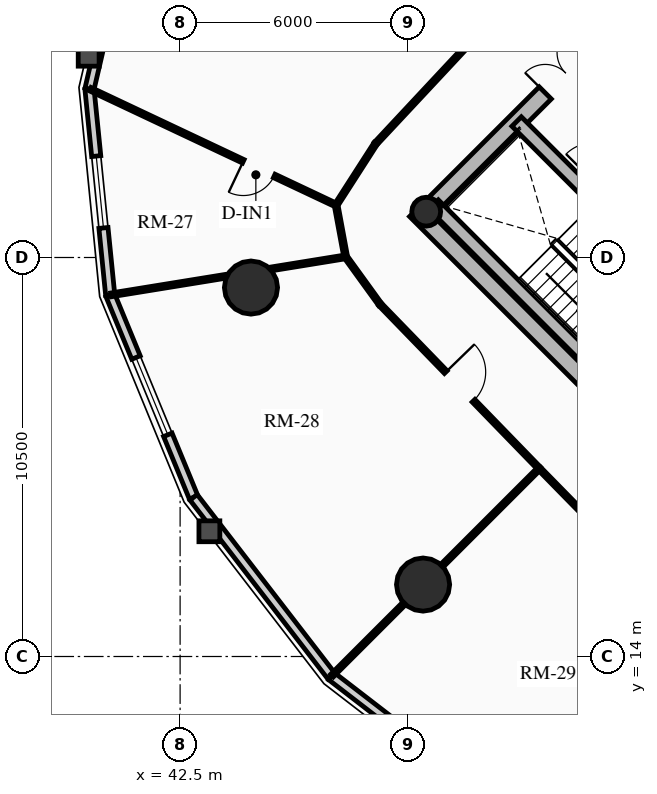
"""IFC4 building model, lengths in metres.
Left out: names, types, materials, properties, quantities, classifications, styles, units other than length and angle.
Written with IfcOpenShell. Run it as: python <this file> out.ifc"""

import sys

from ifc_helpers import new_model, si_unit, direction, frame, frame_2d, origin, origin_2d, place, context, subcontext, project, spatial, rectangle, circle, hollow_circle, extrude, source, transform, mapped, element, fill, save


model = new_model("IFC4")
c1 = context("Model", 3, precision=1e-05, world=origin(), true_north=direction((0.0, 1.0)))
c2 = subcontext(c1, "Body", "Model", "MODEL_VIEW")
j1 = project(units=[si_unit("LENGTHUNIT", "METRE"), si_unit("PLANEANGLEUNIT", "RADIAN")], contexts=[c1])
p1 = place(None, origin())
s1 = spatial("IfcSite", under=j1, at=p1, CompositionType="ELEMENT")
p2 = place(p1, origin())
s2 = spatial("IfcBuilding", under=s1, at=p2, CompositionType="ELEMENT")
p3 = place(p2, frame((0.0, 0.0, 99.25)))
s3 = spatial("IfcBuildingStorey", under=s2, at=p3, CompositionType="ELEMENT", Elevation=99.25)
p4 = place(p3, frame((58.737, 15.697, 0.0), z_axis=(0.0, 0.0, 1.0), x_axis=(-0.707106781187, 0.707106781187, 0.0)))
e1 = element("IfcWall", 1, at=p4, inside=s3, PredefinedType="SHEAR", context=c2, shape_type="SweptSolid", body=[
    extrude(rectangle(XDim=14.2, YDim=0.45, at=frame_2d((7.1, 0.0))), origin(), (0.0, 0.0, 1.0), 2.91),
])
p5 = place(p3, frame((48.856, 25.578, 0.0), z_axis=(0.0, 0.0, 1.0), x_axis=(0.707106781187, 0.707106781187, 0.0)))
e2 = element("IfcWall", 2, at=p5, inside=s3, PredefinedType="SHEAR", context=c2, shape_type="SweptSolid", body=[
    extrude(rectangle(XDim=10.7, YDim=0.45, at=frame_2d((5.35, 0.0))), origin(), (0.0, 0.0, 1.0), 2.91),
])
m1 = source(origin(), c2, "Body", "SweptSolid", [
    extrude(rectangle(XDim=1.5, YDim=2.02, at=frame_2d((0.75, 1.01))), frame((0.0, 0.235, 0.0), z_axis=(0.0, -1.0, 0.0), x_axis=(1.0, 0.0, 0.0)), (0.0, 0.0, 1.0), 0.47),
])
p6 = place(p5, frame((4.6, 0.0, 0.0)))
e3 = element("IfcOpeningElement", 3, at=p6, cuts=e2, PredefinedType="OPENING", context=c2, shape_type="MappedRepresentation", body=[
    mapped(m1, transform((0.0, 0.0, 0.0), x_axis=(1.0, 0.0, 0.0), y_axis=(0.0, 1.0, 0.0), z_axis=(0.0, 0.0, 1.0), scale=1.0)),
])
p7 = place(p3, frame((61.078, 18.355, 0.0), z_axis=(0.0, 0.0, 1.0), x_axis=(-0.707106781187, 0.707106781187, 0.0)))
e4 = element("IfcWall", 4, at=p7, inside=s3, PredefinedType="SHEAR", context=c2, shape_type="SweptSolid", body=[
    extrude(rectangle(XDim=13.75, YDim=0.35, at=frame_2d((6.875, 0.0))), origin(), (0.0, 0.0, 1.0), 2.91),
])
m2 = source(origin(), c2, "Body", "SweptSolid", [
    extrude(rectangle(XDim=1.1, YDim=2.015, at=frame_2d((0.55, 1.007))), frame((0.0, 0.185, 0.0), z_axis=(0.0, -1.0, 0.0), x_axis=(1.0, 0.0, 0.0)), (0.0, 0.0, 1.0), 0.37),
])
p8 = place(p7, frame((4.875, 0.0, 0.0)))
e5 = element("IfcOpeningElement", 5, at=p8, cuts=e4, PredefinedType="OPENING", context=c2, shape_type="MappedRepresentation", body=[
    mapped(m2, transform((0.0, 0.0, 0.0), x_axis=(1.0, 0.0, 0.0), y_axis=(0.0, 1.0, 0.0), z_axis=(0.0, 0.0, 1.0), scale=1.0)),
])
m3 = source(origin(), c2, "Body", "SweptSolid", [
    extrude(rectangle(XDim=1.15, YDim=2.02, at=frame_2d((0.575, 1.01))), frame((0.0, 0.185, 0.0), z_axis=(0.0, -1.0, 0.0), x_axis=(1.0, 0.0, 0.0)), (0.0, 0.0, 1.0), 0.37),
])
p9 = place(p7, frame((7.295, 0.0, 0.0)))
e6 = element("IfcOpeningElement", 6, at=p9, cuts=e4, PredefinedType="OPENING", context=c2, shape_type="MappedRepresentation", body=[
    mapped(m3, transform((0.0, 0.0, 0.0), x_axis=(1.0, 0.0, 0.0), y_axis=(0.0, 1.0, 0.0), z_axis=(0.0, 0.0, 1.0), scale=1.0)),
])
p10 = place(p3, frame((53.922, 21.141, 0.0), z_axis=(0.0, 0.0, 1.0), x_axis=(-0.707088616009, 0.707124945897, 0.0)))
e7 = element("IfcWall", 7, at=p10, inside=s3, PredefinedType="SHEAR", context=c2, shape_type="SweptSolid", body=[
    extrude(rectangle(XDim=6.72, YDim=0.35, at=frame_2d((3.36, 0.0))), origin(), (0.0, 0.0, 1.0), 2.91),
])
p11 = place(p3, frame((48.976, 25.706, 0.0), z_axis=(0.0, 0.0, 1.0), x_axis=(0.707106781187, 0.707106781187, 0.0)))
e8 = element("IfcColumn", 8, at=p11, inside=s3, PredefinedType="COLUMN", context=c2, shape_type="SweptSolid", body=[
    extrude(hollow_circle(Radius=0.38, WallThickness=0.032, at=origin_2d()), origin(), (0.0, 0.0, 1.0), 2.91),
])
for number, where, z_axis, x_axis in (
    (9, (44.365, 23.709, 0.0), (0.0, 0.0, 1.0), (1.0, 0.0, 0.0)),
    (10, (48.893, 15.893, 0.0), (0.0, 0.0, 1.0), (1.0, 0.0, 0.0)),
):
    element("IfcColumn", number, at=place(p3, frame(where, z_axis=z_axis, x_axis=x_axis)), inside=s3, PredefinedType="USERDEFINED", context=c2, shape_type="SweptSolid", body=[
        extrude(circle(Radius=0.7, at=origin_2d()), origin(), (0.0, 0.0, 1.0), 2.91),
    ])
p12 = place(p3, frame((40.115, 28.933, 0.0), z_axis=(0.0, 0.0, 1.0), x_axis=(0.225834725257, 0.974165631126, 0.0)))
e11 = element("IfcWall", 11, at=p12, inside=s3, PredefinedType="SOLIDWALL", context=c2, shape_type="SweptSolid", body=[
    extrude(rectangle(XDim=5.119, YDim=0.24, at=frame_2d((2.56, 0.0))), origin(), (0.0, 0.0, 1.0), 2.179),
])
p13 = place(p3, frame((40.661, 23.513, 0.0), z_axis=(0.0, 0.0, 1.0), x_axis=(-0.10015591906, 0.994971754311, 0.0)))
e12 = element("IfcWall", 12, at=p13, inside=s3, PredefinedType="SOLIDWALL", context=c2, shape_type="SweptSolid", body=[
    extrude(rectangle(XDim=5.448, YDim=0.24, at=frame_2d((2.724, 0.0))), origin(), (0.0, 0.0, 1.0), 2.179),
])
m4 = source(origin(), c2, "Body", "SweptSolid", [
    extrude(rectangle(XDim=1.9, YDim=1.35, at=frame_2d((0.95, 0.675))), frame((0.0, 0.13, 0.0), z_axis=(0.0, -1.0, 0.0), x_axis=(1.0, 0.0, 0.0)), (0.0, 0.0, 1.0), 0.26),
])
p14 = place(p13, frame((1.774, 0.0, 0.65)))
e13 = element("IfcOpeningElement", 13, at=p14, cuts=e12, PredefinedType="OPENING", context=c2, shape_type="MappedRepresentation", body=[
    mapped(m4, transform((0.0, 0.0, 0.0), x_axis=(1.0, 0.0, 0.0), y_axis=(0.0, 1.0, 0.0), z_axis=(0.0, 0.0, 1.0), scale=1.0)),
])
p15 = place(p3, frame((42.855, 18.189, 0.0), z_axis=(0.0, 0.0, 1.0), x_axis=(-0.381027003055, 0.924563909604, 0.0)))
e14 = element("IfcWall", 14, at=p15, inside=s3, PredefinedType="SOLIDWALL", context=c2, shape_type="SweptSolid", body=[
    extrude(rectangle(XDim=5.758, YDim=0.24, at=frame_2d((2.879, 0.0))), origin(), (0.0, 0.0, 1.0), 2.179),
])
m5 = source(origin(), c2, "Body", "SweptSolid", [
    extrude(rectangle(XDim=2.2, YDim=1.35, at=frame_2d((1.1, 0.675))), frame((0.0, 0.13, 0.0), z_axis=(0.0, -1.0, 0.0), x_axis=(1.0, 0.0, 0.0)), (0.0, 0.0, 1.0), 0.26),
])
p16 = place(p15, frame((1.779, 0.0, 0.65)))
e15 = element("IfcOpeningElement", 15, at=p16, cuts=e14, PredefinedType="OPENING", context=c2, shape_type="MappedRepresentation", body=[
    mapped(m5, transform((0.0, 0.0, 0.0), x_axis=(1.0, 0.0, 0.0), y_axis=(0.0, 1.0, 0.0), z_axis=(0.0, 0.0, 1.0), scale=1.0)),
])
p17 = place(p3, frame((46.483, 13.483, 0.0), z_axis=(0.0, 0.0, 1.0), x_axis=(-0.61054437102, 0.791982052206, 0.0)))
e16 = element("IfcWall", 16, at=p17, inside=s3, PredefinedType="SOLIDWALL", context=c2, shape_type="SweptSolid", body=[
    extrude(rectangle(XDim=5.942, YDim=0.24, at=frame_2d((2.971, 0.0))), origin(), (0.0, 0.0, 1.0), 2.179),
])
p18 = place(p3, frame((51.189, 9.855, 0.0), z_axis=(0.0, 0.0, 1.0), x_axis=(-0.791982052206, 0.61054437102, 0.0)))
e17 = element("IfcWall", 17, at=p18, inside=s3, PredefinedType="SOLIDWALL", context=c2, shape_type="SweptSolid", body=[
    extrude(rectangle(XDim=5.942, YDim=0.24, at=frame_2d((2.971, 0.0))), origin(), (0.0, 0.0, 1.0), 2.179),
])
p19 = place(p18, frame((2.021, 0.0, 0.65)))
e18 = element("IfcOpeningElement", 18, at=p19, cuts=e17, PredefinedType="OPENING", context=c2, shape_type="MappedRepresentation", body=[
    mapped(m4, transform((0.0, 0.0, 0.0), x_axis=(1.0, 0.0, 0.0), y_axis=(0.0, 1.0, 0.0), z_axis=(0.0, 0.0, 1.0), scale=1.0)),
])
p20 = place(p3, frame((52.072, 32.237, 0.0), z_axis=(0.0, 0.0, 1.0), x_axis=(-0.682528774423, -0.730858722383, 0.0)))
e19 = element("IfcWall", 19, at=p20, inside=s3, PredefinedType="MOVABLE", context=c2, shape_type="SweptSolid", body=[
    extrude(rectangle(XDim=6.486, YDim=0.1, at=frame_2d((3.243, 0.0))), origin(), (0.0, 0.0, 1.0), 2.225),
])
p21 = place(p3, frame((47.645, 27.497, 0.0), z_axis=(0.0, 0.0, 1.0), x_axis=(-0.540680612097, -0.841227957038, 0.0)))
e20 = element("IfcWall", 20, at=p21, inside=s3, PredefinedType="MOVABLE", context=c2, shape_type="SweptSolid", body=[
    extrude(rectangle(XDim=1.924, YDim=0.1, at=frame_2d((0.962, 0.0))), origin(), (0.0, 0.0, 1.0), 2.225),
])
p22 = place(p3, frame((46.605, 25.879, 0.0), z_axis=(0.0, 0.0, 1.0), x_axis=(0.182019785456, -0.983294868136, 0.0)))
e21 = element("IfcWall", 21, at=p22, inside=s3, PredefinedType="MOVABLE", context=c2, shape_type="SweptSolid", body=[
    extrude(rectangle(XDim=1.384, YDim=0.1, at=frame_2d((0.692, 0.0))), origin(), (0.0, 0.0, 1.0), 2.225),
])
p23 = place(p3, frame((46.857, 24.518, 0.0), z_axis=(0.0, 0.0, 1.0), x_axis=(0.58624548148, -0.810133467674, 0.0)))
e22 = element("IfcWall", 22, at=p23, inside=s3, PredefinedType="MOVABLE", context=c2, shape_type="SweptSolid", body=[
    extrude(rectangle(XDim=1.546, YDim=0.1, at=frame_2d((0.773, 0.0))), origin(), (0.0, 0.0, 1.0), 2.225),
])
p24 = place(p3, frame((47.763, 23.265, 0.0), z_axis=(0.0, 0.0, 1.0), x_axis=(0.696243493404, -0.717805682544, 0.0)))
e23 = element("IfcWall", 23, at=p24, inside=s3, PredefinedType="MOVABLE", context=c2, shape_type="SweptSolid", body=[
    extrude(rectangle(XDim=6.012, YDim=0.1, at=frame_2d((3.006, 0.0))), origin(), (0.0, 0.0, 1.0), 2.655),
])
m6 = source(origin(), c2, "Body", "SweptSolid", [
    extrude(rectangle(XDim=1.05, YDim=2.015, at=frame_2d((0.525, 1.007))), frame((0.0, 0.06, 0.0), z_axis=(0.0, -1.0, 0.0), x_axis=(1.0, 0.0, 0.0)), (0.0, 0.0, 1.0), 0.12),
])
p25 = place(p24, frame((2.481, 0.0, 0.0)))
e24 = element("IfcOpeningElement", 24, at=p25, cuts=e23, PredefinedType="OPENING", context=c2, shape_type="MappedRepresentation", body=[
    mapped(m6, transform((0.0, 0.0, 0.0), x_axis=(1.0, 0.0, 0.0), y_axis=(0.0, 1.0, 0.0), z_axis=(0.0, 0.0, 1.0), scale=1.0)),
])
p26 = place(p3, frame((51.949, 18.949, 0.0), z_axis=(0.0, 0.0, 1.0), x_axis=(0.699840807936, -0.714298847506, 0.0)))
e25 = element("IfcWall", 25, at=p26, inside=s3, PredefinedType="MOVABLE", context=c2, shape_type="SweptSolid", body=[
    extrude(rectangle(XDim=6.13, YDim=0.1, at=frame_2d((3.065, 0.0))), origin(), (0.0, 0.0, 1.0), 2.225),
])
p27 = place(p3, frame((46.857, 24.518, 0.0), z_axis=(0.0, 0.0, 1.0), x_axis=(-0.987101644997, -0.160094792056, 0.0)))
e26 = element("IfcWall", 26, at=p27, inside=s3, PredefinedType="MOVABLE", context=c2, shape_type="SweptSolid", body=[
    extrude(rectangle(XDim=6.257, YDim=0.1, at=frame_2d((3.128, 0.0))), origin(), (0.0, 0.0, 1.0), 2.179),
])
p28 = place(p3, frame((51.949, 18.949, 0.0), z_axis=(0.0, 0.0, 1.0), x_axis=(-0.707106781187, -0.707106781187, 0.0)))
e27 = element("IfcWall", 27, at=p28, inside=s3, PredefinedType="MOVABLE", context=c2, shape_type="SweptSolid", body=[
    extrude(rectangle(XDim=7.711, YDim=0.1, at=frame_2d((3.855, 0.0))), origin(), (0.0, 0.0, 1.0), 2.179),
])
p29 = place(p3, frame((46.605, 25.879, 0.0), z_axis=(0.0, 0.0, 1.0), x_axis=(-0.904450971726, 0.426577589359, 0.0)))
e28 = element("IfcWall", 28, at=p29, inside=s3, PredefinedType="MOVABLE", context=c2, shape_type="SweptSolid", body=[
    extrude(rectangle(XDim=7.154, YDim=0.1, at=frame_2d((3.577, 0.0))), origin(), (0.0, 0.0, 1.0), 2.179),
])
m7 = source(origin(), c2, "Body", "SweptSolid", [
    extrude(rectangle(XDim=0.9, YDim=2.005, at=frame_2d((0.45, 1.002))), frame((0.0, 0.06, 0.0), z_axis=(0.0, -1.0, 0.0), x_axis=(1.0, 0.0, 0.0)), (0.0, 0.0, 1.0), 0.12),
])
p30 = place(p29, frame((1.8, 0.0, 0.0)))
e29 = element("IfcOpeningElement", 29, at=p30, cuts=e28, PredefinedType="OPENING", context=c2, shape_type="MappedRepresentation", body=[
    mapped(m7, transform((0.0, 0.0, 0.0), x_axis=(1.0, 0.0, 0.0), y_axis=(0.0, 1.0, 0.0), z_axis=(0.0, 0.0, 1.0), scale=1.0)),
])
m8 = source(origin(), c2, "Body", "SweptSolid", [
    extrude(rectangle(XDim=1.9, YDim=1.35, at=frame_2d((0.95, 0.675))), frame((0.0, 0.03, 0.0), z_axis=(0.0, -1.0, 0.0), x_axis=(1.0, 0.0, 0.0)), (0.0, 0.0, 1.0), 0.06),
])
p31 = place(p14, origin())
e30 = element("IfcWindow", 30, at=p31, inside=s3, PartitioningType="DOUBLE_PANEL_VERTICAL", PredefinedType="WINDOW", context=c2, shape_type="MappedRepresentation", body=[
    mapped(m8, transform((0.0, 0.0, 0.0), x_axis=(1.0, 0.0, 0.0), y_axis=(0.0, 1.0, 0.0), z_axis=(0.0, 0.0, 1.0), scale=1.0)),
])
fill(e13, e30)
m9 = source(origin(), c2, "Body", "SweptSolid", [
    extrude(rectangle(XDim=2.2, YDim=1.35, at=frame_2d((1.1, 0.675))), frame((0.0, 0.03, 0.0), z_axis=(0.0, -1.0, 0.0), x_axis=(1.0, 0.0, 0.0)), (0.0, 0.0, 1.0), 0.06),
])
p32 = place(p16, origin())
e31 = element("IfcWindow", 31, at=p32, inside=s3, PartitioningType="DOUBLE_PANEL_VERTICAL", PredefinedType="WINDOW", context=c2, shape_type="MappedRepresentation", body=[
    mapped(m9, transform((0.0, 0.0, 0.0), x_axis=(1.0, 0.0, 0.0), y_axis=(0.0, 1.0, 0.0), z_axis=(0.0, 0.0, 1.0), scale=1.0)),
])
fill(e15, e31)
m10 = source(origin(), c2, "Body", "SweptSolid", [
    extrude(rectangle(XDim=1.5, YDim=2.02, at=frame_2d((0.75, 1.01))), frame((0.0, 0.025, 0.0), z_axis=(0.0, -1.0, 0.0), x_axis=(1.0, 0.0, 0.0)), (0.0, 0.0, 1.0), 0.05),
])
p33 = place(p6, origin())
e32 = element("IfcDoor", 32, at=p33, inside=s3, OperationType="DOUBLE_DOOR_SINGLE_SWING", PredefinedType="DOOR", context=c2, shape_type="MappedRepresentation", body=[
    mapped(m10, transform((0.0, 0.0, 0.0), x_axis=(1.0, 0.0, 0.0), y_axis=(0.0, 1.0, 0.0), z_axis=(0.0, 0.0, 1.0), scale=1.0)),
])
fill(e3, e32)
m11 = source(origin(), c2, "Body", "SweptSolid", [
    extrude(rectangle(XDim=0.9, YDim=2.005, at=frame_2d((0.45, 1.002))), frame((0.0, 0.025, 0.0), z_axis=(0.0, -1.0, 0.0), x_axis=(1.0, 0.0, 0.0)), (0.0, 0.0, 1.0), 0.05),
])
p34 = place(p30, origin())
e33 = element("IfcDoor", 33, at=p34, inside=s3, OperationType="SINGLE_SWING_RIGHT", PredefinedType="DOOR", context=c2, shape_type="MappedRepresentation", body=[
    mapped(m11, transform((0.0, 0.0, 0.0), x_axis=(1.0, 0.0, 0.0), y_axis=(0.0, 1.0, 0.0), z_axis=(0.0, 0.0, 1.0), scale=1.0)),
])
fill(e29, e33)
m12 = source(origin(), c2, "Body", "SweptSolid", [
    extrude(rectangle(XDim=1.05, YDim=2.015, at=frame_2d((0.525, 1.007))), frame((0.0, 0.025, 0.0), z_axis=(0.0, -1.0, 0.0), x_axis=(1.0, 0.0, 0.0)), (0.0, 0.0, 1.0), 0.05),
])
p35 = place(p25, origin())
e34 = element("IfcDoor", 34, at=p35, inside=s3, OperationType="SINGLE_SWING_LEFT", PredefinedType="DOOR", context=c2, shape_type="MappedRepresentation", body=[
    mapped(m12, transform((0.0, 0.0, 0.0), x_axis=(1.0, 0.0, 0.0), y_axis=(0.0, 1.0, 0.0), z_axis=(0.0, 0.0, 1.0), scale=1.0)),
])
fill(e24, e34)
save(model, sys.argv[1])
